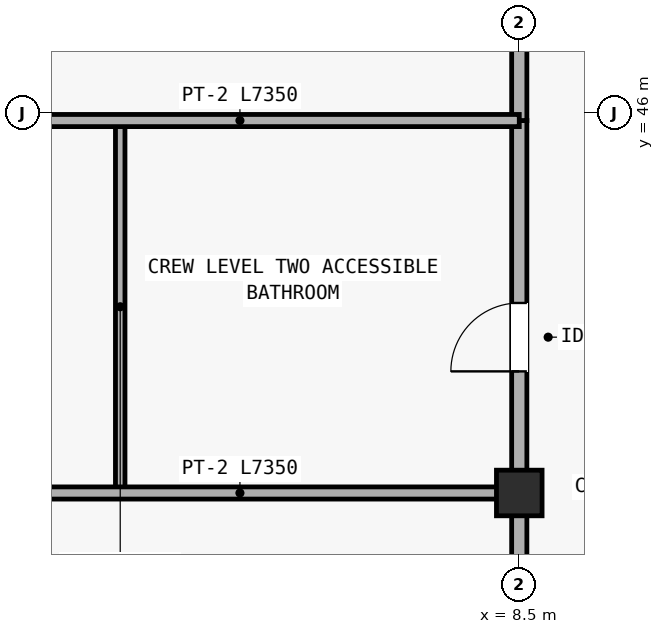
"""IFC4 building model, lengths in metres.
Left out: names, types, materials, properties, quantities, classifications, styles, units other than length and angle.
Written with IfcOpenShell. Run it as: python <this file> out.ifc"""

import sys

from ifc_helpers import new_model, si_unit, direction, frame, frame_2d, origin, origin_2d, place, context, subcontext, project, spatial, rectangle, extrude, element, fill, save


model = new_model("IFC4")
c1 = context("Model", 3, precision=1e-05, world=origin(), true_north=direction((0.0, 1.0)))
c2 = subcontext(c1, "Body", "Model", "MODEL_VIEW")
j1 = project(units=[si_unit("LENGTHUNIT", "METRE"), si_unit("PLANEANGLEUNIT", "RADIAN")], contexts=[c1])
p1 = place(None, origin())
s1 = spatial("IfcSite", under=j1, at=p1, CompositionType="ELEMENT")
p2 = place(p1, origin())
s2 = spatial("IfcBuilding", under=s1, at=p2, CompositionType="ELEMENT")
p3 = place(p2, frame((0.0, 0.0, 5.85)))
s3 = spatial("IfcBuildingStorey", under=s2, at=p3, CompositionType="ELEMENT", Elevation=5.85)
p4 = place(p3, frame((8.5, 41.0, 0.0), z_axis=(0.0, 0.0, 1.0), x_axis=(1.0, 0.0, 0.0)))
e1 = element("IfcColumn", 1, at=p4, inside=s3, PredefinedType="COLUMN", context=c2, shape_type="SweptSolid", body=[
    extrude(rectangle(XDim=0.6, YDim=0.6, at=origin_2d()), origin(), (0.0, 0.0, 1.0), 3.45),
])
p5 = place(p3, frame((8.5, 27.74, 0.0), z_axis=(0.0, 0.0, 1.0), x_axis=(0.0, 1.0, 0.0)))
e2 = element("IfcWall", 2, at=p5, inside=s3, PredefinedType="PARTITIONING", context=c2, shape_type="SweptSolid", body=[
    extrude(rectangle(XDim=13.26, YDim=0.2, at=frame_2d((6.63, 0.0))), origin(), (0.0, 0.0, 1.0), 2.7),
])
p6 = place(p5, frame((3.2, 0.0, 0.0)))
e3 = element("IfcOpeningElement", 3, at=p6, cuts=e2, PredefinedType="OPENING", context=c2, shape_type="SweptSolid", body=[
    extrude(rectangle(XDim=1.02, YDim=2.14, at=frame_2d((0.51, 1.07))), frame((0.0, 0.11, 0.0), z_axis=(0.0, -1.0, 0.0), x_axis=(1.0, 0.0, 0.0)), (0.0, 0.0, 1.0), 0.22),
])
p7 = place(p3, frame((8.5, 41.0, 0.0), z_axis=(0.0, 0.0, 1.0), x_axis=(0.0, 1.0, 0.0)))
e4 = element("IfcWall", 4, at=p7, inside=s3, PredefinedType="PARTITIONING", context=c2, shape_type="SweptSolid", body=[
    extrude(rectangle(XDim=4.9, YDim=0.2, at=frame_2d((2.45, 0.0))), origin(), (0.0, 0.0, 1.0), 2.7),
])
p8 = place(p7, frame((1.6, 0.0, 0.0)))
e5 = element("IfcOpeningElement", 5, at=p8, cuts=e4, PredefinedType="OPENING", context=c2, shape_type="SweptSolid", body=[
    extrude(rectangle(XDim=0.9, YDim=2.08, at=frame_2d((0.45, 1.04))), frame((0.0, 0.11, 0.0), z_axis=(0.0, -1.0, 0.0), x_axis=(1.0, 0.0, 0.0)), (0.0, 0.0, 1.0), 0.22),
])
p9 = place(p3, frame((3.25, 41.0, 0.0), z_axis=(0.0, 0.0, 1.0), x_axis=(0.0, 1.0, 0.0)))
e6 = element("IfcWall", 6, at=p9, inside=s3, PredefinedType="PARTITIONING", context=c2, shape_type="SweptSolid", body=[
    extrude(rectangle(XDim=4.9, YDim=0.125, at=frame_2d((2.45, 0.0))), origin(), (0.0, 0.0, 1.0), 2.7),
])
p10 = place(p3, frame((8.5, 45.9, 0.0), z_axis=(0.0, 0.0, 1.0), x_axis=(0.0, 1.0, 0.0)))
e7 = element("IfcWall", 7, at=p10, inside=s3, PredefinedType="PARTITIONING", context=c2, shape_type="SweptSolid", body=[
    extrude(rectangle(XDim=18.95, YDim=0.2, at=frame_2d((9.475, 0.0))), origin(), (0.0, 0.0, 1.0), 2.7),
])
p11 = place(p10, frame((2.2, 0.0, 0.0)))
e8 = element("IfcOpeningElement", 8, at=p11, cuts=e7, PredefinedType="OPENING", context=c2, shape_type="SweptSolid", body=[
    extrude(rectangle(XDim=1.0, YDim=2.12, at=frame_2d((0.5, 1.06))), frame((0.0, 0.11, 0.0), z_axis=(0.0, -1.0, 0.0), x_axis=(1.0, 0.0, 0.0)), (0.0, 0.0, 1.0), 0.22),
])
for number, where, z_axis, x_axis in (
    (9, (1.15, 41.0, 0.0), (0.0, 0.0, 1.0), (1.0, 0.0, 0.0)),
    (10, (1.15, 45.9, 0.0), (0.0, 0.0, 1.0), (1.0, 0.0, 0.0)),
):
    element("IfcWall", number, at=place(p3, frame(where, z_axis=z_axis, x_axis=x_axis)), inside=s3, PredefinedType="PARTITIONING", context=c2, shape_type="SweptSolid", body=[
        extrude(rectangle(XDim=7.35, YDim=0.16, at=frame_2d((3.675, 0.0))), origin(), (0.0, 0.0, 1.0), 2.7),
    ])
p12 = place(p8, origin())
e11 = element("IfcDoor", 11, at=p12, inside=s3, OperationType="SINGLE_SWING_LEFT", PredefinedType="DOOR", context=c2, shape_type="SweptSolid", body=[
    extrude(rectangle(XDim=0.9, YDim=2.08, at=frame_2d((0.45, 1.04))), frame((0.0, 0.025, 0.0), z_axis=(0.0, -1.0, 0.0), x_axis=(1.0, 0.0, 0.0)), (0.0, 0.0, 1.0), 0.05),
])
fill(e5, e11)
save(model, sys.argv[1])
